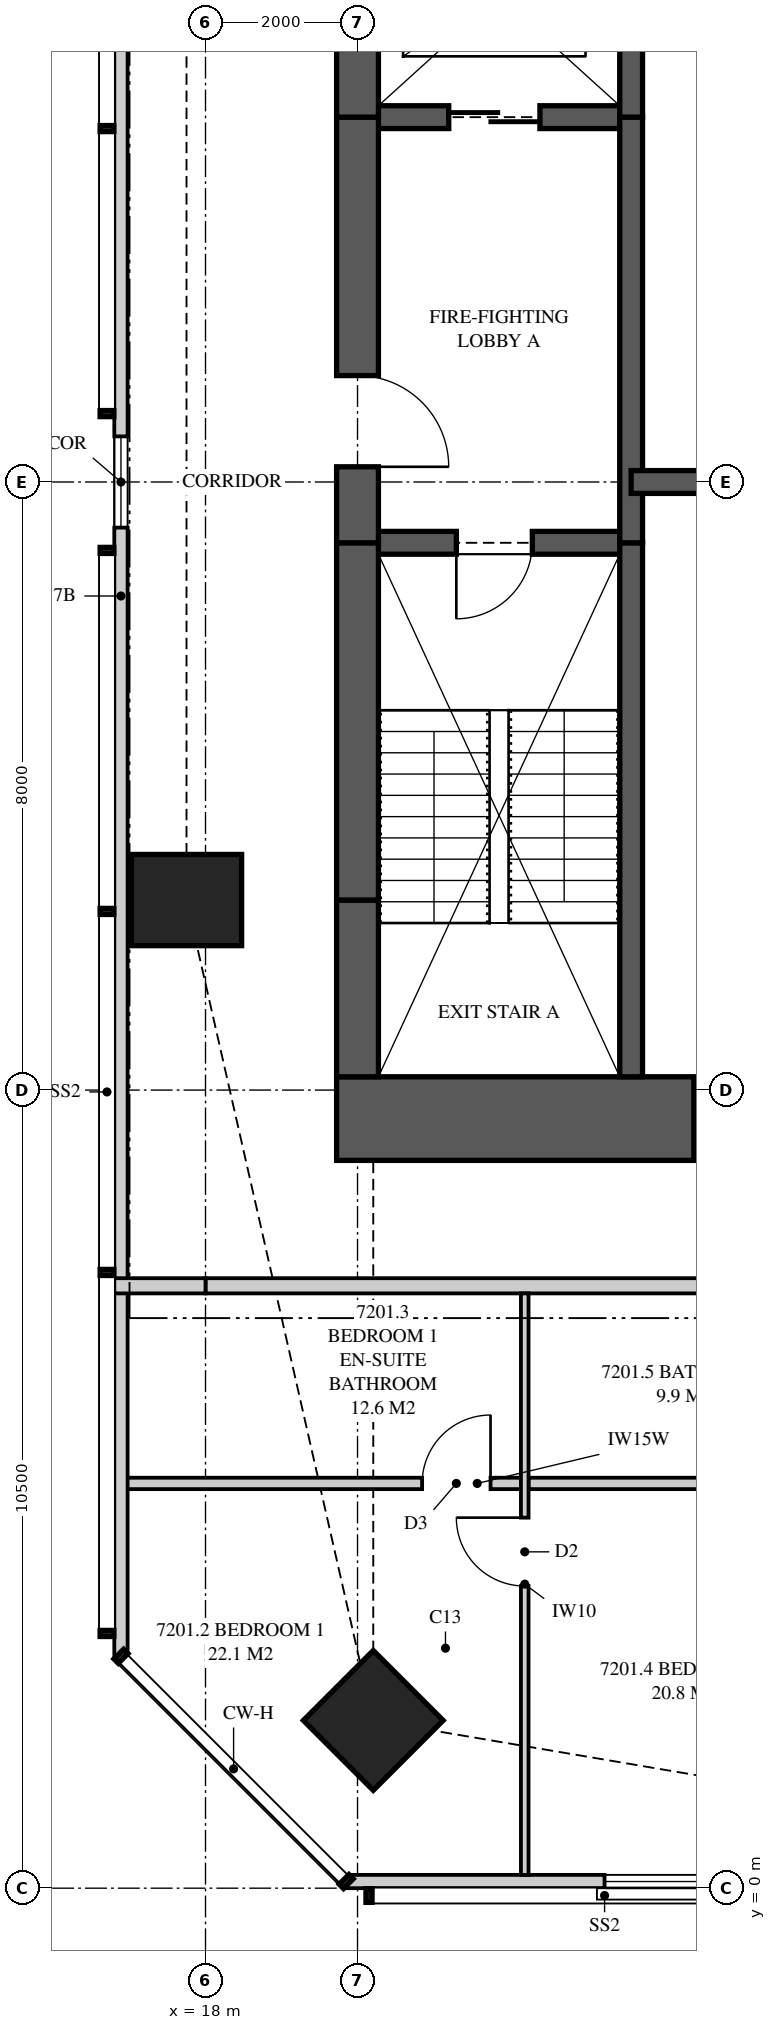
"""IFC4 building model, lengths in metres.
Left out: names, types, materials, properties, quantities, classifications, styles, units other than length and angle.
Written with IfcOpenShell. Run it as: python <this file> out.ifc"""

import sys

from ifc_helpers import new_model, si_unit, direction, frame, frame_2d, origin, origin_2d, place, context, subcontext, project, spatial, polyline, rectangle, outline, extrude, element, fill, save


model = new_model("IFC4")
c1 = context("Model", 3, precision=1e-05, world=origin(), true_north=direction((0.0, 1.0)))
c2 = subcontext(c1, "Body", "Model", "MODEL_VIEW")
j1 = project(units=[si_unit("LENGTHUNIT", "METRE"), si_unit("PLANEANGLEUNIT", "RADIAN")], contexts=[c1])
p1 = place(None, origin())
s1 = spatial("IfcSite", under=j1, at=p1, CompositionType="ELEMENT")
p2 = place(p1, origin())
s2 = spatial("IfcBuilding", under=s1, at=p2, CompositionType="ELEMENT")
p3 = place(p2, frame((0.0, 0.0, 263.85)))
s3 = spatial("IfcBuildingStorey", under=s2, at=p3, CompositionType="ELEMENT", Elevation=263.85)
p4 = place(p3, frame((20.207, 2.207, 0.0), z_axis=(0.0, 0.0, 1.0), x_axis=(0.707106781187, 0.707106781187, 0.0)))
e1 = element("IfcColumn", 1, at=p4, inside=s3, PredefinedType="COLUMN", context=c2, shape_type="SweptSolid", body=[
    extrude(rectangle(XDim=1.3, YDim=1.3, at=origin_2d()), origin(), (0.0, 0.0, 1.0), 3.9),
])
p5 = place(p3, frame((17.75, 13.0, 0.0), z_axis=(0.0, 0.0, 1.0), x_axis=(1.0, 0.0, 0.0)))
e2 = element("IfcColumn", 2, at=p5, inside=s3, PredefinedType="COLUMN", context=c2, shape_type="SweptSolid", body=[
    extrude(rectangle(XDim=1.45, YDim=1.2, at=origin_2d()), origin(), (0.0, 0.0, 1.0), 3.9),
])
p6 = place(p3, frame((19.725, 10.125, 0.0), z_axis=(0.0, 0.0, 1.0), x_axis=(1.0, 0.0, 0.0)))
e3 = element("IfcWall", 3, at=p6, inside=s3, PredefinedType="SHEAR", context=c2, shape_type="SweptSolid", body=[
    extrude(rectangle(XDim=6.275, YDim=1.1, at=frame_2d((3.137, 0.0))), origin(), (0.0, 0.0, 1.0), 3.9),
])
p7 = place(p6, frame((4.7, 0.0, 0.0)))
e4 = element("IfcOpeningElement", 4, at=p7, cuts=e3, PredefinedType="OPENING", context=c2, shape_type="SweptSolid", body=[
    extrude(rectangle(XDim=0.75, YDim=2.1, at=frame_2d((0.375, 1.05))), frame((0.0, 0.56, 0.0), z_axis=(0.0, -1.0, 0.0), x_axis=(1.0, 0.0, 0.0)), (0.0, 0.0, 1.0), 1.12),
])
p8 = place(p3, frame((20.0, 26.325, 0.0), z_axis=(0.0, 0.0, 1.0), x_axis=(0.0, -1.0, 0.0)))
e5 = element("IfcWall", 5, at=p8, inside=s3, PredefinedType="SHEAR", context=c2, shape_type="SweptSolid", body=[
    extrude(rectangle(XDim=3.025, YDim=0.55, at=frame_2d((1.512, 0.0))), origin(), (0.0, 0.0, 1.0), 3.9),
])
p9 = place(p3, frame((20.0, 23.3, 0.0), z_axis=(0.0, 0.0, 1.0), x_axis=(0.0, -1.0, 0.0)))
e6 = element("IfcWall", 6, at=p9, inside=s3, PredefinedType="SHEAR", context=c2, shape_type="SweptSolid", body=[
    extrude(rectangle(XDim=5.6, YDim=0.55, at=frame_2d((2.8, 0.0))), origin(), (0.0, 0.0, 1.0), 3.9),
])
p10 = place(p9, frame((3.4, 0.0, 0.0)))
e7 = element("IfcOpeningElement", 7, at=p10, cuts=e6, PredefinedType="OPENING", context=c2, shape_type="SweptSolid", body=[
    extrude(rectangle(XDim=1.2, YDim=2.2, at=frame_2d((0.6, 1.1))), frame((0.0, 0.285, 0.0), z_axis=(0.0, -1.0, 0.0), x_axis=(1.0, 0.0, 0.0)), (0.0, 0.0, 1.0), 0.57),
])
p11 = place(p3, frame((20.0, 17.7, 0.0), z_axis=(0.0, 0.0, 1.0), x_axis=(0.0, -1.0, 0.0)))
e8 = element("IfcWall", 8, at=p11, inside=s3, PredefinedType="SHEAR", context=c2, shape_type="SweptSolid", body=[
    extrude(rectangle(XDim=4.7, YDim=0.55, at=frame_2d((2.35, 0.0))), origin(), (0.0, 0.0, 1.0), 3.9),
])
p12 = place(p3, frame((20.0, 13.0, 0.0), z_axis=(0.0, 0.0, 1.0), x_axis=(0.0, -1.0, 0.0)))
e9 = element("IfcWall", 9, at=p12, inside=s3, PredefinedType="SHEAR", context=c2, shape_type="SweptSolid", body=[
    extrude(rectangle(XDim=2.325, YDim=0.55, at=frame_2d((1.163, 0.0))), origin(), (0.0, 0.0, 1.0), 3.9),
])
p13 = place(p3, frame((23.6, 10.675, 0.0), z_axis=(0.0, 0.0, 1.0), x_axis=(0.0, 1.0, 0.0)))
e10 = element("IfcWall", 10, at=p13, inside=s3, PredefinedType="SHEAR", context=c2, shape_type="SweptSolid", body=[
    extrude(rectangle(XDim=7.025, YDim=0.3, at=frame_2d((3.512, 0.0))), origin(), (0.0, 0.0, 1.0), 3.9),
])
p14 = place(p3, frame((23.6, 17.7, 0.0), z_axis=(0.0, 0.0, 1.0), x_axis=(0.0, 1.0, 0.0)))
e11 = element("IfcWall", 11, at=p14, inside=s3, PredefinedType="SHEAR", context=c2, shape_type="SweptSolid", body=[
    extrude(rectangle(XDim=5.6, YDim=0.3, at=frame_2d((2.8, 0.0))), origin(), (0.0, 0.0, 1.0), 3.9),
])
p15 = place(p3, frame((23.6, 23.3, 0.0), z_axis=(0.0, 0.0, 1.0), x_axis=(0.0, 1.0, 0.0)))
e12 = element("IfcWall", 12, at=p15, inside=s3, PredefinedType="SHEAR", context=c2, shape_type="SweptSolid", body=[
    extrude(rectangle(XDim=3.025, YDim=0.3, at=frame_2d((1.512, 0.0))), origin(), (0.0, 0.0, 1.0), 3.9),
])
p16 = place(p3, frame((20.0, 17.7, 0.0), z_axis=(0.0, 0.0, 1.0), x_axis=(1.0, 0.0, 0.0)))
e13 = element("IfcWall", 13, at=p16, inside=s3, PredefinedType="SHEAR", context=c2, shape_type="SweptSolid", body=[
    extrude(rectangle(XDim=3.6, YDim=0.3, at=frame_2d((1.8, 0.0))), origin(), (0.0, 0.0, 1.0), 3.9),
])
p17 = place(p16, frame((1.3, 0.0, 0.0)))
e14 = element("IfcOpeningElement", 14, at=p17, cuts=e13, PredefinedType="OPENING", context=c2, shape_type="SweptSolid", body=[
    extrude(rectangle(XDim=1.0, YDim=2.1, at=frame_2d((0.5, 1.05))), frame((0.0, 0.16, 0.0), z_axis=(0.0, -1.0, 0.0), x_axis=(1.0, 0.0, 0.0)), (0.0, 0.0, 1.0), 0.32),
])
p18 = place(p3, frame((20.0, 23.3, 0.0), z_axis=(0.0, 0.0, 1.0), x_axis=(1.0, 0.0, 0.0)))
e15 = element("IfcWall", 15, at=p18, inside=s3, PredefinedType="SHEAR", context=c2, shape_type="SweptSolid", body=[
    extrude(rectangle(XDim=3.6, YDim=0.3, at=frame_2d((1.8, 0.0))), origin(), (0.0, 0.0, 1.0), 3.9),
])
p19 = place(p18, frame((1.2, 0.0, 0.0)))
e16 = element("IfcOpeningElement", 16, at=p19, cuts=e15, PredefinedType="OPENING", context=c2, shape_type="SweptSolid", body=[
    extrude(rectangle(XDim=1.2, YDim=2.1, at=frame_2d((0.6, 1.05))), frame((0.0, 0.16, 0.0), z_axis=(0.0, -1.0, 0.0), x_axis=(1.0, 0.0, 0.0)), (0.0, 0.0, 1.0), 0.32),
])
p20 = place(p3, frame((23.6, 18.5, 0.0), z_axis=(0.0, 0.0, 1.0), x_axis=(1.0, 0.0, 0.0)))
e17 = element("IfcWall", 17, at=p20, inside=s3, PredefinedType="SHEAR", context=c2, shape_type="SweptSolid", body=[
    extrude(rectangle(XDim=2.4, YDim=0.3, at=frame_2d((1.2, 0.0))), origin(), (0.0, 0.0, 1.0), 3.9),
])
p21 = place(p3, frame((19.851, 0.087, 0.0), z_axis=(0.0, 0.0, 1.0), x_axis=(1.0, 0.0, 0.0)))
e18 = element("IfcWall", 18, at=p21, inside=s3, PredefinedType="SOLIDWALL", context=c2, shape_type="SweptSolid", body=[
    extrude(outline(polyline([(0.0, 0.0), (18.049, 0.0), (18.049, 2.7), (7.774, 2.7), (7.774, 3.62), (7.642, 3.62), (7.642, 2.7), (7.559, 2.7), (7.559, 3.62), (0.0, 3.62), (0.0, 0.0)])), frame((0.0, 0.087, 0.0), z_axis=(0.0, -1.0, 0.0), x_axis=(1.0, 0.0, 0.0)), (0.0, 0.0, 1.0), 0.175),
])
p22 = place(p21, frame((3.399, 0.0, 0.4)))
e19 = element("IfcOpeningElement", 19, at=p22, cuts=e18, PredefinedType="OPENING", context=c2, shape_type="SweptSolid", body=[
    extrude(rectangle(XDim=2.1, YDim=2.25, at=frame_2d((1.05, 1.125))), frame((0.0, 0.097, 0.0), z_axis=(0.0, -1.0, 0.0), x_axis=(1.0, 0.0, 0.0)), (0.0, 0.0, 1.0), 0.195),
])
p23 = place(p21, frame((8.655, 0.0, 0.4)))
e20 = element("IfcOpeningElement", 20, at=p23, cuts=e18, PredefinedType="OPENING", context=c2, shape_type="SweptSolid", body=[
    extrude(rectangle(XDim=2.1, YDim=2.25, at=frame_2d((1.05, 1.125))), frame((0.0, 0.097, 0.0), z_axis=(0.0, -1.0, 0.0), x_axis=(1.0, 0.0, 0.0)), (0.0, 0.0, 1.0), 0.195),
])
p24 = place(p21, frame((11.649, 0.0, 0.4)))
e21 = element("IfcOpeningElement", 21, at=p24, cuts=e18, PredefinedType="OPENING", context=c2, shape_type="SweptSolid", body=[
    extrude(rectangle(XDim=2.1, YDim=2.25, at=frame_2d((1.05, 1.125))), frame((0.0, 0.097, 0.0), z_axis=(0.0, -1.0, 0.0), x_axis=(1.0, 0.0, 0.0)), (0.0, 0.0, 1.0), 0.195),
])
p25 = place(p3, frame((16.887, 30.949, 0.0), z_axis=(0.0, 0.0, 1.0), x_axis=(0.0, -1.0, 0.0)))
e22 = element("IfcWall", 22, at=p25, inside=s3, PredefinedType="SOLIDWALL", context=c2, shape_type="SweptSolid", body=[
    extrude(outline(polyline([(0.0, 0.0), (27.897, 0.0), (27.897, 3.62), (18.148, 3.62), (18.148, 2.7), (18.125, 2.7), (18.125, 3.62), (17.949, 3.62), (17.949, 2.7), (5.949, 2.7), (5.949, 3.62), (0.0, 3.62), (0.0, 0.0)])), frame((0.0, 0.087, 0.0), z_axis=(0.0, -1.0, 0.0), x_axis=(1.0, 0.0, 0.0)), (0.0, 0.0, 1.0), 0.175),
])
p26 = place(p25, frame((11.849, 0.0, 0.4)))
e23 = element("IfcOpeningElement", 23, at=p26, cuts=e22, PredefinedType="OPENING", context=c2, shape_type="SweptSolid", body=[
    extrude(rectangle(XDim=1.2, YDim=2.0, at=frame_2d((0.6, 1.0))), frame((0.0, 0.097, 0.0), z_axis=(0.0, -1.0, 0.0), x_axis=(1.0, 0.0, 0.0)), (0.0, 0.0, 1.0), 0.195),
])
p27 = place(p3, frame((18.0, 7.925, 0.0), z_axis=(0.0, 0.0, 1.0), x_axis=(1.0, 0.0, 0.0)))
e24 = element("IfcWall", 24, at=p27, inside=s3, PredefinedType="PARTITIONING", context=c2, shape_type="SweptSolid", body=[
    extrude(outline(polyline([(0.0, 0.0), (27.875, 0.0), (27.875, 3.62), (27.875, 3.02), (27.565, 3.02), (27.565, 3.62), (20.56, 3.62), (20.56, 3.02), (17.94, 3.02), (17.94, 3.62), (10.935, 3.62), (10.935, 3.02), (8.315, 3.02), (8.315, 3.62), (3.517, 3.62), (3.517, 3.02), (1.839, 3.02), (1.839, 2.7), (0.0, 2.7), (0.0, 3.62), (0.0, 0.0)])), frame((0.0, 0.1, 0.0), z_axis=(0.0, -1.0, 0.0), x_axis=(1.0, 0.0, 0.0)), (0.0, 0.0, 1.0), 0.2),
])
p28 = place(p27, frame((18.75, 0.0, 0.0)))
e25 = element("IfcOpeningElement", 25, at=p28, cuts=e24, PredefinedType="OPENING", context=c2, shape_type="SweptSolid", body=[
    extrude(rectangle(XDim=1.05, YDim=2.2, at=frame_2d((0.525, 1.1))), frame((0.0, 0.11, 0.0), z_axis=(0.0, -1.0, 0.0), x_axis=(1.0, 0.0, 0.0)), (0.0, 0.0, 1.0), 0.22),
])
p29 = place(p3, frame((22.2, 0.175, 0.0), z_axis=(0.0, 0.0, 1.0), x_axis=(0.0, 1.0, 0.0)))
e26 = element("IfcWall", 26, at=p29, inside=s3, PredefinedType="PARTITIONING", context=c2, shape_type="SweptSolid", body=[
    extrude(outline(polyline([(0.0, 0.0), (7.65, 0.0), (7.65, 3.62), (2.567, 3.62), (2.567, 2.7), (0.822, 2.7), (0.822, 3.62), (0.0, 3.62), (0.0, 0.0)])), frame((0.0, 0.05, 0.0), z_axis=(0.0, -1.0, 0.0), x_axis=(1.0, 0.0, 0.0)), (0.0, 0.0, 1.0), 0.1),
])
p30 = place(p29, frame((3.8, 0.0, 0.0)))
e27 = element("IfcOpeningElement", 27, at=p30, cuts=e26, PredefinedType="OPENING", context=c2, shape_type="SweptSolid", body=[
    extrude(rectangle(XDim=0.9, YDim=2.1, at=frame_2d((0.45, 1.05))), frame((0.0, 0.06, 0.0), z_axis=(0.0, -1.0, 0.0), x_axis=(1.0, 0.0, 0.0)), (0.0, 0.0, 1.0), 0.12),
])
p31 = place(p3, frame((16.8, 5.325, 0.0), z_axis=(0.0, 0.0, 1.0), x_axis=(1.0, 0.0, 0.0)))
e28 = element("IfcWall", 28, at=p31, inside=s3, PredefinedType="PLUMBINGWALL", context=c2, shape_type="SweptSolid", body=[
    extrude(outline(polyline([(0.0, 0.0), (5.35, 0.0), (5.35, 3.62), (4.692, 3.62), (4.692, 3.02), (3.605, 3.02), (3.605, 2.7), (1.79, 2.7), (1.79, 3.62), (0.0, 3.62), (0.0, 0.0)])), frame((0.0, 0.075, 0.0), z_axis=(0.0, -1.0, 0.0), x_axis=(1.0, 0.0, 0.0)), (0.0, 0.0, 1.0), 0.15),
])
p32 = place(p31, frame((4.05, 0.0, 0.0)))
e29 = element("IfcOpeningElement", 29, at=p32, cuts=e28, PredefinedType="OPENING", context=c2, shape_type="SweptSolid", body=[
    extrude(rectangle(XDim=0.9, YDim=2.1, at=frame_2d((0.45, 1.05))), frame((0.0, 0.085, 0.0), z_axis=(0.0, -1.0, 0.0), x_axis=(1.0, 0.0, 0.0)), (0.0, 0.0, 1.0), 0.17),
])
p33 = place(p3, frame((22.25, 5.325, 0.0), z_axis=(0.0, 0.0, 1.0), x_axis=(1.0, 0.0, 0.0)))
e30 = element("IfcWall", 30, at=p33, inside=s3, PredefinedType="PLUMBINGWALL", context=c2, shape_type="SweptSolid", body=[
    extrude(outline(polyline([(0.0, 0.0), (4.1, 0.0), (4.1, 3.62), (4.1, 3.02), (4.09, 3.02), (4.09, 3.62), (0.0, 3.62), (0.0, 0.0)])), frame((0.0, 0.075, 0.0), z_axis=(0.0, -1.0, 0.0), x_axis=(1.0, 0.0, 0.0)), (0.0, 0.0, 1.0), 0.15),
])
p34 = place(p3, frame((16.8, 7.925, 0.0), z_axis=(0.0, 0.0, 1.0), x_axis=(1.0, 0.0, 0.0)))
e31 = element("IfcWall", 31, at=p34, inside=s3, PredefinedType="PARTITIONING", context=c2, shape_type="SweptSolid", body=[
    extrude(outline(polyline([(0.0, 0.0), (1.2, 0.0), (1.2, 3.62), (1.2, 2.7), (1.172, 2.7), (1.172, 3.62), (0.0, 3.62), (0.0, 0.0)])), frame((0.0, 0.1, 0.0), z_axis=(0.0, -1.0, 0.0), x_axis=(1.0, 0.0, 0.0)), (0.0, 0.0, 1.0), 0.2),
])
p35 = place(p22, origin())
e32 = element("IfcWindow", 32, at=p35, inside=s3, PartitioningType="SINGLE_PANEL", PredefinedType="WINDOW", context=c2, shape_type="SweptSolid", body=[
    extrude(rectangle(XDim=2.1, YDim=2.25, at=frame_2d((1.05, 1.125))), frame((0.0, 0.03, 0.0), z_axis=(0.0, -1.0, 0.0), x_axis=(1.0, 0.0, 0.0)), (0.0, 0.0, 1.0), 0.06),
])
fill(e19, e32)
p36 = place(p26, origin())
e33 = element("IfcWindow", 33, at=p36, inside=s3, PartitioningType="SINGLE_PANEL", PredefinedType="WINDOW", context=c2, shape_type="SweptSolid", body=[
    extrude(rectangle(XDim=1.2, YDim=2.0, at=frame_2d((0.6, 1.0))), frame((0.0, 0.03, 0.0), z_axis=(0.0, -1.0, 0.0), x_axis=(1.0, 0.0, 0.0)), (0.0, 0.0, 1.0), 0.06),
])
fill(e23, e33)
p37 = place(p30, origin())
e34 = element("IfcDoor", 34, at=p37, inside=s3, OperationType="SINGLE_SWING_RIGHT", PredefinedType="DOOR", context=c2, shape_type="SweptSolid", body=[
    extrude(rectangle(XDim=0.9, YDim=2.1, at=frame_2d((0.45, 1.05))), frame((0.0, 0.025, 0.0), z_axis=(0.0, -1.0, 0.0), x_axis=(1.0, 0.0, 0.0)), (0.0, 0.0, 1.0), 0.05),
])
fill(e27, e34)
p38 = place(p32, origin())
e35 = element("IfcDoor", 35, at=p38, inside=s3, OperationType="SINGLE_SWING_RIGHT", PredefinedType="DOOR", context=c2, shape_type="SweptSolid", body=[
    extrude(rectangle(XDim=0.9, YDim=2.1, at=frame_2d((0.45, 1.05))), frame((0.0, 0.025, 0.0), z_axis=(0.0, -1.0, 0.0), x_axis=(1.0, 0.0, 0.0)), (0.0, 0.0, 1.0), 0.05),
])
fill(e29, e35)
p39 = place(p17, frame((1.0, 0.0, 0.0), z_axis=(0.0, 0.0, 1.0), x_axis=(-1.0, 0.0, 0.0)))
e36 = element("IfcDoor", 36, at=p39, inside=s3, OperationType="SINGLE_SWING_RIGHT", PredefinedType="DOOR", context=c2, shape_type="SweptSolid", body=[
    extrude(rectangle(XDim=1.0, YDim=2.1, at=frame_2d((0.5, 1.05))), frame((0.0, 0.025, 0.0), z_axis=(0.0, -1.0, 0.0), x_axis=(1.0, 0.0, 0.0)), (0.0, 0.0, 1.0), 0.05),
])
fill(e14, e36)
p40 = place(p10, origin())
e37 = element("IfcDoor", 37, at=p40, inside=s3, OperationType="SINGLE_SWING_RIGHT", PredefinedType="DOOR", context=c2, shape_type="SweptSolid", body=[
    extrude(rectangle(XDim=1.2, YDim=2.2, at=frame_2d((0.6, 1.1))), frame((0.0, 0.025, 0.0), z_axis=(0.0, -1.0, 0.0), x_axis=(1.0, 0.0, 0.0)), (0.0, 0.0, 1.0), 0.05),
])
fill(e7, e37)
p41 = place(p19, origin())
e38 = element("IfcDoor", 38, at=p41, inside=s3, OperationType="SLIDING_TO_LEFT", PredefinedType="DOOR", context=c2, shape_type="SweptSolid", body=[
    extrude(rectangle(XDim=1.2, YDim=2.1, at=frame_2d((0.6, 1.05))), frame((0.0, 0.025, 0.0), z_axis=(0.0, -1.0, 0.0), x_axis=(1.0, 0.0, 0.0)), (0.0, 0.0, 1.0), 0.05),
])
fill(e16, e38)
p42 = place(p7, origin())
e39 = element("IfcDoor", 39, at=p42, inside=s3, OperationType="SINGLE_SWING_RIGHT", PredefinedType="DOOR", context=c2, shape_type="SweptSolid", body=[
    extrude(rectangle(XDim=0.75, YDim=2.1, at=frame_2d((0.375, 1.05))), frame((0.0, 0.025, 0.0), z_axis=(0.0, -1.0, 0.0), x_axis=(1.0, 0.0, 0.0)), (0.0, 0.0, 1.0), 0.05),
])
fill(e4, e39)
save(model, sys.argv[1])
